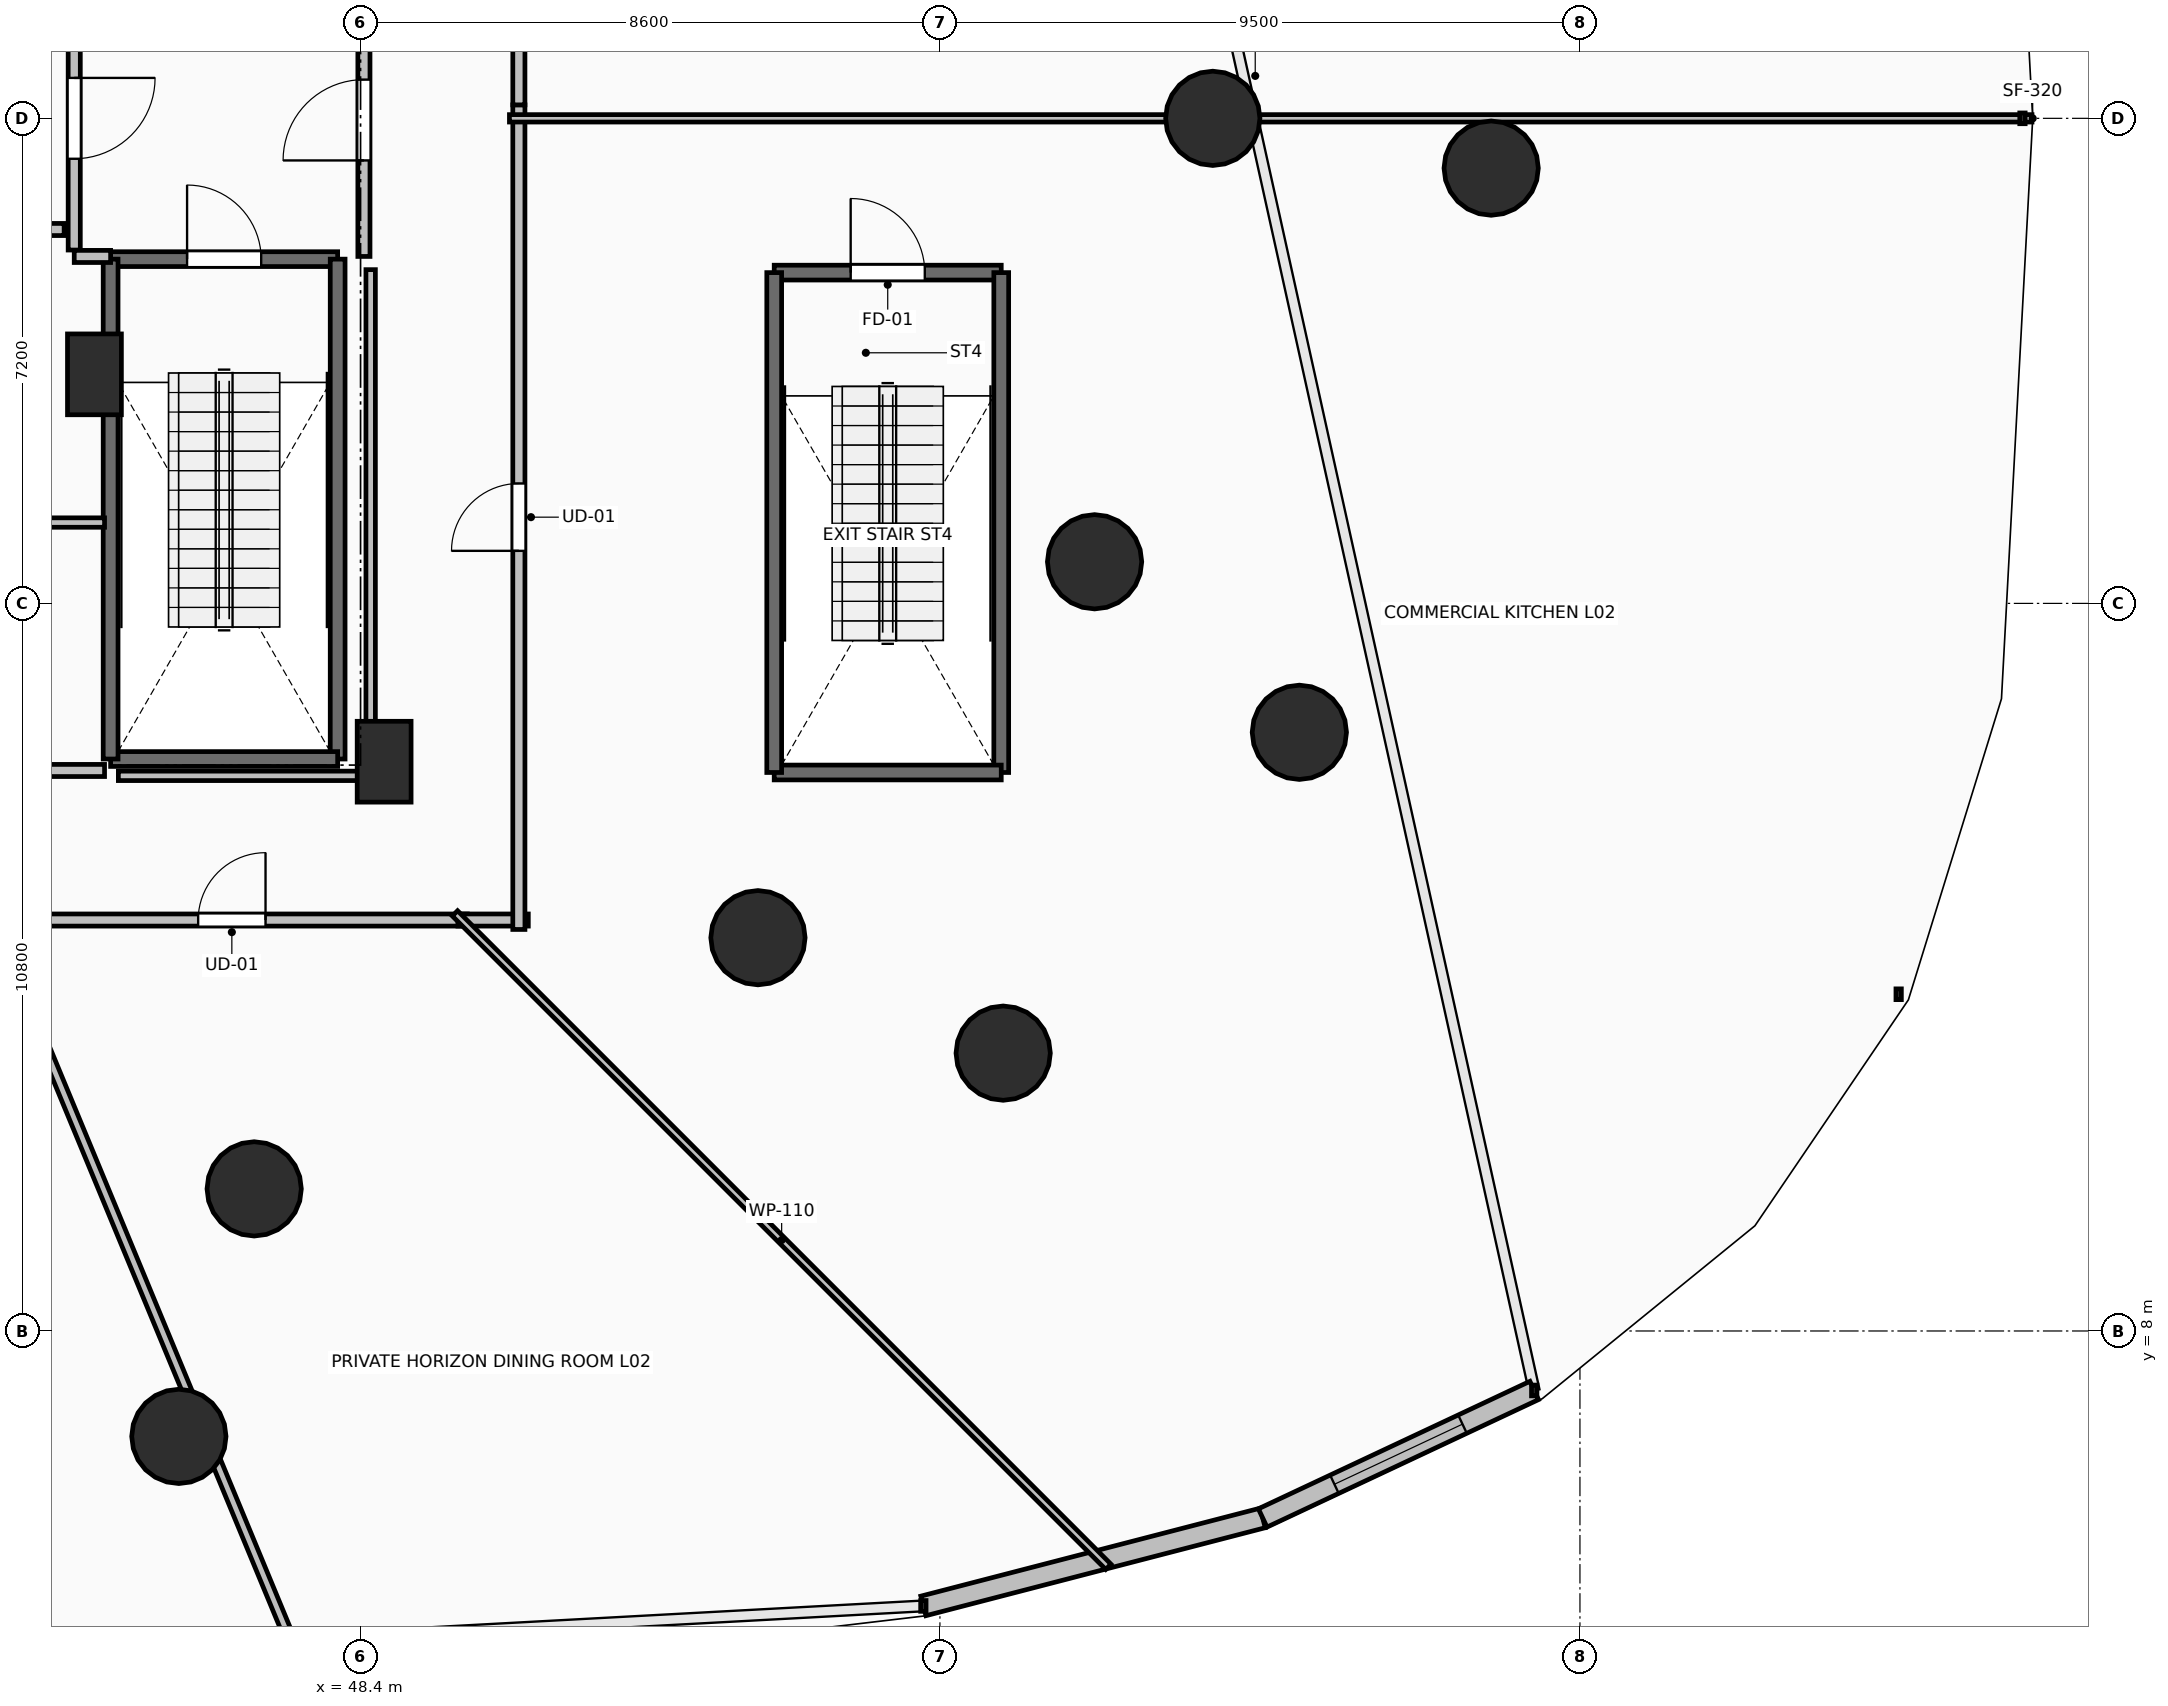
"""IFC4 building model, lengths in metres.
Left out: names, types, materials, properties, quantities, classifications, styles, units other than length and angle.
Written with IfcOpenShell. Run it as: python <this file> out.ifc"""

import sys

from ifc_helpers import new_model, si_unit, direction, frame, frame_2d, origin, origin_2d, place, context, subcontext, project, spatial, rectangle, circle, extrude, element, fill, save


model = new_model("IFC4")
c1 = context("Model", 3, precision=1e-05, world=origin(), true_north=direction((0.0, 1.0)))
c2 = subcontext(c1, "Body", "Model", "MODEL_VIEW")
j1 = project(units=[si_unit("LENGTHUNIT", "METRE"), si_unit("PLANEANGLEUNIT", "RADIAN")], contexts=[c1])
p1 = place(None, origin())
s1 = spatial("IfcSite", under=j1, at=p1, CompositionType="ELEMENT")
p2 = place(p1, origin())
s2 = spatial("IfcBuilding", under=s1, at=p2, CompositionType="ELEMENT")
p3 = place(p2, frame((0.0, 0.0, 9.6)))
s3 = spatial("IfcBuildingStorey", under=s2, at=p3, CompositionType="ELEMENT", Elevation=9.6)
for number, where, z_axis, x_axis in (
    (1, (61.05, 26.0, 0.0), (0.0, 0.0, 1.0), (1.0, 0.0, 0.0)),
    (2, (46.821, 10.109, 0.0), (0.0, 0.0, 1.0), (0.383, -0.924, 0.0)),
    (3, (54.299, 13.838, 0.0), (0.0, 0.0, 1.0), (0.707, -0.707, 0.0)),
    (4, (59.295, 19.418, 0.0), (0.0, 0.0, 1.0), (0.924, -0.383, 0.0)),
    (5, (65.182, 25.261, 0.0), (0.0, 0.0, 1.0), (1.0, 0.0, 0.0)),
    (6, (45.703, 6.435, 0.0), (0.0, 0.0, 1.0), (0.383, -0.924, 0.0)),
    (7, (57.939, 12.124, 0.0), (0.0, 0.0, 1.0), (0.707, -0.707, 0.0)),
    (8, (62.335, 16.886, 0.0), (0.0, 0.0, 1.0), (0.924, -0.383, 0.0)),
):
    element("IfcColumn", number, at=place(p3, frame(where, z_axis=z_axis, x_axis=x_axis)), inside=s3, PredefinedType="COLUMN", context=c2, shape_type="SweptSolid", body=[
        extrude(circle(Radius=0.7, at=origin_2d()), origin(), (0.0, 0.0, 1.0), 4.8),
    ])
for number, where, z_axis, x_axis in (
    (9, (48.75, 16.45, 0.0), (0.0, 0.0, 1.0), (1.0, 0.0, 0.0)),
    (10, (44.45, 22.2, 0.0), (0.0, 0.0, 1.0), (1.0, 0.0, 0.0)),
):
    element("IfcColumn", number, at=place(p3, frame(where, z_axis=z_axis, x_axis=x_axis)), inside=s3, PredefinedType="PILASTER", context=c2, shape_type="SweptSolid", body=[
        extrude(rectangle(XDim=0.8, YDim=1.2, at=origin_2d()), origin(), (0.0, 0.0, 1.0), 4.8),
    ])
p4 = place(p3, frame((56.754, 3.919, 0.0), z_axis=(0.0, 0.0, 1.0), x_axis=(0.968005762902, 0.250927963744, 0.0)))
e11 = element("IfcWall", 11, at=p4, inside=s3, PredefinedType="STANDARD", context=c2, shape_type="SweptSolid", body=[
    extrude(rectangle(XDim=5.203, YDim=0.3, at=frame_2d((2.602, 0.0))), origin(), (0.0, 0.0, 1.0), 4.48),
])
p5 = place(p3, frame((61.791, 5.225, 0.0), z_axis=(0.0, 0.0, 1.0), x_axis=(0.905197342389, 0.4249914956, 0.0)))
e12 = element("IfcWall", 12, at=p5, inside=s3, PredefinedType="STANDARD", context=c2, shape_type="SweptSolid", body=[
    extrude(rectangle(XDim=4.453, YDim=0.3, at=frame_2d((2.226, 0.0))), origin(), (0.0, 0.0, 1.0), 4.48),
])
p6 = place(p5, frame((1.176, 0.0, 0.85)))
e13 = element("IfcOpeningElement", 13, at=p6, cuts=e12, PredefinedType="OPENING", context=c2, shape_type="SweptSolid", body=[
    extrude(rectangle(XDim=2.1, YDim=2.8, at=frame_2d((1.05, 1.4))), frame((0.0, 0.165, 0.0), z_axis=(0.0, -1.0, 0.0), x_axis=(1.0, 0.0, 0.0)), (0.0, 0.0, 1.0), 0.33),
])
p7 = place(p3, frame((44.69, 23.91, 0.0), z_axis=(0.0, 0.0, 1.0), x_axis=(1.0, 0.0, 0.0)))
e14 = element("IfcWall", 14, at=p7, inside=s3, PredefinedType="SOLIDWALL", context=c2, shape_type="SweptSolid", body=[
    extrude(rectangle(XDim=3.37, YDim=0.22, at=frame_2d((1.685, 0.0))), origin(), (0.0, 0.0, 1.0), 4.48),
])
p8 = place(p7, frame((1.135, 0.0, 0.0)))
e15 = element("IfcOpeningElement", 15, at=p8, cuts=e14, PredefinedType="OPENING", context=c2, shape_type="SweptSolid", body=[
    extrude(rectangle(XDim=1.1, YDim=2.15, at=frame_2d((0.55, 1.075))), frame((0.0, 0.125, 0.0), z_axis=(0.0, -1.0, 0.0), x_axis=(1.0, 0.0, 0.0)), (0.0, 0.0, 1.0), 0.25),
])
p9 = place(p3, frame((48.06, 23.91, 0.0), z_axis=(0.0, 0.0, 1.0), x_axis=(0.0, -1.0, 0.0)))
e16 = element("IfcWall", 16, at=p9, inside=s3, PredefinedType="SOLIDWALL", context=c2, shape_type="SweptSolid", body=[
    extrude(rectangle(XDim=7.42, YDim=0.22, at=frame_2d((3.71, 0.0))), origin(), (0.0, 0.0, 1.0), 4.48),
])
p10 = place(p3, frame((48.06, 16.49, 0.0), z_axis=(0.0, 0.0, 1.0), x_axis=(-1.0, 0.0, 0.0)))
e17 = element("IfcWall", 17, at=p10, inside=s3, PredefinedType="SOLIDWALL", context=c2, shape_type="SweptSolid", body=[
    extrude(rectangle(XDim=3.37, YDim=0.22, at=frame_2d((1.685, 0.0))), origin(), (0.0, 0.0, 1.0), 4.48),
])
p11 = place(p3, frame((44.69, 16.49, 0.0), z_axis=(0.0, 0.0, 1.0), x_axis=(0.0, 1.0, 0.0)))
e18 = element("IfcWall", 18, at=p11, inside=s3, PredefinedType="SOLIDWALL", context=c2, shape_type="SweptSolid", body=[
    extrude(rectangle(XDim=7.42, YDim=0.22, at=frame_2d((3.71, 0.0))), origin(), (0.0, 0.0, 1.0), 4.48),
])
p12 = place(p3, frame((54.54, 23.71, 0.0), z_axis=(0.0, 0.0, 1.0), x_axis=(1.0, 0.0, 0.0)))
e19 = element("IfcWall", 19, at=p12, inside=s3, PredefinedType="SOLIDWALL", context=c2, shape_type="SweptSolid", body=[
    extrude(rectangle(XDim=3.37, YDim=0.22, at=frame_2d((1.685, 0.0))), origin(), (0.0, 0.0, 1.0), 4.48),
])
p13 = place(p12, frame((1.135, 0.0, 0.0)))
e20 = element("IfcOpeningElement", 20, at=p13, cuts=e19, PredefinedType="OPENING", context=c2, shape_type="SweptSolid", body=[
    extrude(rectangle(XDim=1.1, YDim=2.15, at=frame_2d((0.55, 1.075))), frame((0.0, 0.125, 0.0), z_axis=(0.0, -1.0, 0.0), x_axis=(1.0, 0.0, 0.0)), (0.0, 0.0, 1.0), 0.25),
])
p14 = place(p3, frame((57.91, 23.71, 0.0), z_axis=(0.0, 0.0, 1.0), x_axis=(0.0, -1.0, 0.0)))
e21 = element("IfcWall", 21, at=p14, inside=s3, PredefinedType="SOLIDWALL", context=c2, shape_type="SweptSolid", body=[
    extrude(rectangle(XDim=7.42, YDim=0.22, at=frame_2d((3.71, 0.0))), origin(), (0.0, 0.0, 1.0), 4.48),
])
p15 = place(p3, frame((57.91, 16.29, 0.0), z_axis=(0.0, 0.0, 1.0), x_axis=(-1.0, 0.0, 0.0)))
e22 = element("IfcWall", 22, at=p15, inside=s3, PredefinedType="SOLIDWALL", context=c2, shape_type="SweptSolid", body=[
    extrude(rectangle(XDim=3.37, YDim=0.22, at=frame_2d((1.685, 0.0))), origin(), (0.0, 0.0, 1.0), 4.48),
])
p16 = place(p3, frame((54.54, 16.29, 0.0), z_axis=(0.0, 0.0, 1.0), x_axis=(0.0, 1.0, 0.0)))
e23 = element("IfcWall", 23, at=p16, inside=s3, PredefinedType="SOLIDWALL", context=c2, shape_type="SweptSolid", body=[
    extrude(rectangle(XDim=7.42, YDim=0.22, at=frame_2d((3.71, 0.0))), origin(), (0.0, 0.0, 1.0), 4.48),
])
p17 = place(p3, frame((44.15, 27.955, 0.0), z_axis=(0.0, 0.0, 1.0), x_axis=(0.0, -1.0, 0.0)))
e24 = element("IfcWall", 24, at=p17, inside=s3, PredefinedType="PARTITIONING", context=c2, shape_type="SweptSolid", body=[
    extrude(rectangle(XDim=3.91, YDim=0.18, at=frame_2d((1.955, 0.0))), origin(), (0.0, 0.0, 1.0), 4.48),
])
p18 = place(p17, frame((1.355, 0.0, 0.0)))
e25 = element("IfcOpeningElement", 25, at=p18, cuts=e24, PredefinedType="OPENING", context=c2, shape_type="SweptSolid", body=[
    extrude(rectangle(XDim=1.2, YDim=2.15, at=frame_2d((0.6, 1.075))), frame((0.0, 0.105, 0.0), z_axis=(0.0, -1.0, 0.0), x_axis=(1.0, 0.0, 0.0)), (0.0, 0.0, 1.0), 0.21),
])
p19 = place(p3, frame((44.15, 23.95, 0.0), z_axis=(0.0, 0.0, 1.0), x_axis=(1.0, 0.0, 0.0)))
e26 = element("IfcWall", 26, at=p19, inside=s3, PredefinedType="PARTITIONING", context=c2, shape_type="SweptSolid", body=[
    extrude(rectangle(XDim=0.54, YDim=0.18, at=frame_2d((0.27, 0.0))), origin(), (0.0, 0.0, 1.0), 4.48),
])
p20 = place(p3, frame((48.45, 23.95, 0.0), z_axis=(0.0, 0.0, 1.0), x_axis=(0.0, 1.0, 0.0)))
e27 = element("IfcWall", 27, at=p20, inside=s3, PredefinedType="PARTITIONING", context=c2, shape_type="SweptSolid", body=[
    extrude(rectangle(XDim=4.05, YDim=0.18, at=frame_2d((2.025, 0.0))), origin(), (0.0, 0.0, 1.0), 4.48),
])
p21 = place(p20, frame((1.425, 0.0, 0.0)))
e28 = element("IfcOpeningElement", 28, at=p21, cuts=e27, PredefinedType="OPENING", context=c2, shape_type="SweptSolid", body=[
    extrude(rectangle(XDim=1.2, YDim=2.15, at=frame_2d((0.6, 1.075))), frame((0.0, 0.105, 0.0), z_axis=(0.0, -1.0, 0.0), x_axis=(1.0, 0.0, 0.0)), (0.0, 0.0, 1.0), 0.21),
])
p22 = place(p3, frame((41.555, 24.35, 0.0), z_axis=(0.0, 0.0, 1.0), x_axis=(1.0, 0.0, 0.0)))
e29 = element("IfcWall", 29, at=p22, inside=s3, PredefinedType="PARTITIONING", context=c2, shape_type="SweptSolid", body=[
    extrude(rectangle(XDim=2.445, YDim=0.18, at=frame_2d((1.223, 0.0))), origin(), (0.0, 0.0, 1.0), 4.48),
])
p23 = place(p22, frame((0.722, 0.0, 0.0)))
e30 = element("IfcOpeningElement", 30, at=p23, cuts=e29, PredefinedType="OPENING", context=c2, shape_type="SweptSolid", body=[
    extrude(rectangle(XDim=1.0, YDim=2.15, at=frame_2d((0.5, 1.075))), frame((0.0, 0.105, 0.0), z_axis=(0.0, -1.0, 0.0), x_axis=(1.0, 0.0, 0.0)), (0.0, 0.0, 1.0), 0.21),
])
p24 = place(p3, frame((44.6, 20.0, 0.0), z_axis=(0.0, 0.0, 1.0), x_axis=(-1.0, 0.0, 0.0)))
e31 = element("IfcWall", 31, at=p24, inside=s3, PredefinedType="PARTITIONING", context=c2, shape_type="SweptSolid", body=[
    extrude(rectangle(XDim=3.2, YDim=0.14, at=frame_2d((1.6, 0.0))), origin(), (0.0, 0.0, 1.0), 4.48),
])
p25 = place(p3, frame((41.4, 16.32, 0.0), z_axis=(0.0, 0.0, 1.0), x_axis=(1.0, 0.0, 0.0)))
e32 = element("IfcWall", 32, at=p25, inside=s3, PredefinedType="PARTITIONING", context=c2, shape_type="SweptSolid", body=[
    extrude(rectangle(XDim=3.2, YDim=0.18, at=frame_2d((1.6, 0.0))), origin(), (0.0, 0.0, 1.0), 4.48),
])
p26 = place(p25, frame((1.2, 0.0, 0.0)))
e33 = element("IfcOpeningElement", 33, at=p26, cuts=e32, PredefinedType="OPENING", context=c2, shape_type="SweptSolid", body=[
    extrude(rectangle(XDim=0.8, YDim=2.05, at=frame_2d((0.4, 1.025))), frame((0.0, 0.105, 0.0), z_axis=(0.0, -1.0, 0.0), x_axis=(1.0, 0.0, 0.0)), (0.0, 0.0, 1.0), 0.21),
])
p27 = place(p3, frame((42.994, 14.1, 0.0), z_axis=(0.0, 0.0, 1.0), x_axis=(1.0, 0.0, 0.0)))
e34 = element("IfcWall", 34, at=p27, inside=s3, PredefinedType="PARTITIONING", context=c2, shape_type="SweptSolid", body=[
    extrude(rectangle(XDim=6.991, YDim=0.18, at=frame_2d((3.496, 0.0))), origin(), (0.0, 0.0, 1.0), 3.672),
])
p28 = place(p27, frame((2.996, 0.0, 0.0)))
e35 = element("IfcOpeningElement", 35, at=p28, cuts=e34, PredefinedType="OPENING", context=c2, shape_type="SweptSolid", body=[
    extrude(rectangle(XDim=1.0, YDim=2.15, at=frame_2d((0.5, 1.075))), frame((0.0, 0.105, 0.0), z_axis=(0.0, -1.0, 0.0), x_axis=(1.0, 0.0, 0.0)), (0.0, 0.0, 1.0), 0.21),
])
p29 = place(p3, frame((49.845, 14.1, 0.0), z_axis=(0.0, 0.0, 1.0), x_axis=(1.0, 0.0, 0.0)))
e36 = element("IfcWall", 36, at=p29, inside=s3, PredefinedType="PARTITIONING", context=c2, shape_type="SweptSolid", body=[
    extrude(rectangle(XDim=1.045, YDim=0.18, at=frame_2d((0.522, 0.0))), origin(), (0.0, 0.0, 1.0), 4.169),
])
p30 = place(p3, frame((50.75, 13.96, 0.0), z_axis=(0.0, 0.0, 1.0), x_axis=(0.0, 1.0, 0.0)))
e37 = element("IfcWall", 37, at=p30, inside=s3, PredefinedType="PARTITIONING", context=c2, shape_type="SweptSolid", body=[
    extrude(rectangle(XDim=12.24, YDim=0.18, at=frame_2d((6.12, 0.0))), origin(), (0.0, 0.0, 1.0), 3.672),
])
p31 = place(p30, frame((5.62, 0.0, 0.0)))
e38 = element("IfcOpeningElement", 38, at=p31, cuts=e37, PredefinedType="OPENING", context=c2, shape_type="SweptSolid", body=[
    extrude(rectangle(XDim=1.0, YDim=2.15, at=frame_2d((0.5, 1.075))), frame((0.0, 0.105, 0.0), z_axis=(0.0, -1.0, 0.0), x_axis=(1.0, 0.0, 0.0)), (0.0, 0.0, 1.0), 0.21),
])
p32 = place(p3, frame((50.75, 26.2, 0.0), z_axis=(0.0, 0.0, 1.0), x_axis=(0.0, 1.0, 0.0)))
e39 = element("IfcWall", 39, at=p32, inside=s3, PredefinedType="PARTITIONING", context=c2, shape_type="SweptSolid", body=[
    extrude(rectangle(XDim=9.75, YDim=0.18, at=frame_2d((4.875, 0.0))), origin(), (0.0, 0.0, 1.0), 3.672),
])
p33 = place(p32, frame((4.375, 0.0, 0.0)))
e40 = element("IfcOpeningElement", 40, at=p33, cuts=e39, PredefinedType="OPENING", context=c2, shape_type="SweptSolid", body=[
    extrude(rectangle(XDim=1.0, YDim=2.15, at=frame_2d((0.5, 1.075))), frame((0.0, 0.105, 0.0), z_axis=(0.0, -1.0, 0.0), x_axis=(1.0, 0.0, 0.0)), (0.0, 0.0, 1.0), 0.21),
])
p34 = place(p3, frame((47.486, 3.099, 0.0), z_axis=(0.0, 0.0, 1.0), x_axis=(-0.38271032831, 0.923868391388, 0.0)))
e41 = element("IfcWall", 41, at=p34, inside=s3, PredefinedType="PARTITIONING", context=c2, shape_type="SweptSolid", body=[
    extrude(rectangle(XDim=11.907, YDim=0.14, at=frame_2d((5.954, 0.0))), origin(), (0.0, 0.0, 1.0), 3.672),
])
p35 = place(p3, frame((59.5, 4.5, 0.0), z_axis=(0.0, 0.0, 1.0), x_axis=(-0.707106781187, 0.707106781187, 0.0)))
e42 = element("IfcWall", 42, at=p35, inside=s3, PredefinedType="PARTITIONING", context=c2, shape_type="SweptSolid", body=[
    extrude(rectangle(XDim=13.716, YDim=0.11, at=frame_2d((6.858, 0.0))), origin(), (0.0, 0.0, 1.0), 3.769),
])
p36 = place(p3, frame((73.21, 26.0, 0.0), z_axis=(0.0, 0.0, 1.0), x_axis=(-1.0, 0.0, 0.0)))
e43 = element("IfcWall", 43, at=p36, inside=s3, PredefinedType="PARTITIONING", context=c2, shape_type="SweptSolid", body=[
    extrude(rectangle(XDim=22.6, YDim=0.11, at=frame_2d((11.3, 0.0))), origin(), (0.0, 0.0, 1.0), 3.672),
])
p37 = place(p3, frame((48.55, 23.754, 0.0), z_axis=(0.0, 0.0, 1.0), x_axis=(0.0, -1.0, 0.0)))
e44 = element("IfcWall", 44, at=p37, inside=s3, PredefinedType="PARTITIONING", context=c2, shape_type="SweptSolid", body=[
    extrude(rectangle(XDim=7.514, YDim=0.14, at=frame_2d((3.757, 0.0))), origin(), (0.0, 0.0, 1.0), 2.406),
])
p38 = place(p3, frame((48.55, 16.24, 0.0), z_axis=(0.0, 0.0, 1.0), x_axis=(-1.0, 0.0, 0.0)))
e45 = element("IfcWall", 45, at=p38, inside=s3, PredefinedType="PARTITIONING", context=c2, shape_type="SweptSolid", body=[
    extrude(rectangle(XDim=3.745, YDim=0.14, at=frame_2d((1.873, 0.0))), origin(), (0.0, 0.0, 1.0), 3.672),
])
p39 = place(p6, origin())
e46 = element("IfcWindow", 46, at=p39, inside=s3, PartitioningType="SINGLE_PANEL", PredefinedType="WINDOW", context=c2, shape_type="SweptSolid", body=[
    extrude(rectangle(XDim=2.1, YDim=2.8, at=frame_2d((1.05, 1.4))), frame((0.0, 0.03, 0.0), z_axis=(0.0, -1.0, 0.0), x_axis=(1.0, 0.0, 0.0)), (0.0, 0.0, 1.0), 0.06),
])
fill(e13, e46)
p40 = place(p8, origin())
e47 = element("IfcDoor", 47, at=p40, inside=s3, OperationType="SINGLE_SWING_LEFT", PredefinedType="DOOR", context=c2, shape_type="SweptSolid", body=[
    extrude(rectangle(XDim=1.1, YDim=2.15, at=frame_2d((0.55, 1.075))), frame((0.0, 0.025, 0.0), z_axis=(0.0, -1.0, 0.0), x_axis=(1.0, 0.0, 0.0)), (0.0, 0.0, 1.0), 0.05),
])
fill(e15, e47)
p41 = place(p13, origin())
e48 = element("IfcDoor", 48, at=p41, inside=s3, OperationType="SINGLE_SWING_LEFT", PredefinedType="DOOR", context=c2, shape_type="SweptSolid", body=[
    extrude(rectangle(XDim=1.1, YDim=2.15, at=frame_2d((0.55, 1.075))), frame((0.0, 0.025, 0.0), z_axis=(0.0, -1.0, 0.0), x_axis=(1.0, 0.0, 0.0)), (0.0, 0.0, 1.0), 0.05),
])
fill(e20, e48)
p42 = place(p18, origin())
e49 = element("IfcDoor", 49, at=p42, inside=s3, OperationType="SINGLE_SWING_LEFT", PredefinedType="DOOR", context=c2, shape_type="SweptSolid", body=[
    extrude(rectangle(XDim=1.2, YDim=2.15, at=frame_2d((0.6, 1.075))), frame((0.0, 0.025, 0.0), z_axis=(0.0, -1.0, 0.0), x_axis=(1.0, 0.0, 0.0)), (0.0, 0.0, 1.0), 0.05),
])
fill(e25, e49)
p43 = place(p21, origin())
e50 = element("IfcDoor", 50, at=p43, inside=s3, OperationType="SINGLE_SWING_LEFT", PredefinedType="DOOR", context=c2, shape_type="SweptSolid", body=[
    extrude(rectangle(XDim=1.2, YDim=2.15, at=frame_2d((0.6, 1.075))), frame((0.0, 0.025, 0.0), z_axis=(0.0, -1.0, 0.0), x_axis=(1.0, 0.0, 0.0)), (0.0, 0.0, 1.0), 0.05),
])
fill(e28, e50)
p44 = place(p28, origin())
e51 = element("IfcDoor", 51, at=p44, inside=s3, OperationType="SINGLE_SWING_RIGHT", PredefinedType="DOOR", context=c2, shape_type="SweptSolid", body=[
    extrude(rectangle(XDim=1.0, YDim=2.15, at=frame_2d((0.5, 1.075))), frame((0.0, 0.025, 0.0), z_axis=(0.0, -1.0, 0.0), x_axis=(1.0, 0.0, 0.0)), (0.0, 0.0, 1.0), 0.05),
])
fill(e35, e51)
p45 = place(p31, origin())
e52 = element("IfcDoor", 52, at=p45, inside=s3, OperationType="SINGLE_SWING_LEFT", PredefinedType="DOOR", context=c2, shape_type="SweptSolid", body=[
    extrude(rectangle(XDim=1.0, YDim=2.15, at=frame_2d((0.5, 1.075))), frame((0.0, 0.025, 0.0), z_axis=(0.0, -1.0, 0.0), x_axis=(1.0, 0.0, 0.0)), (0.0, 0.0, 1.0), 0.05),
])
fill(e38, e52)
save(model, sys.argv[1])
